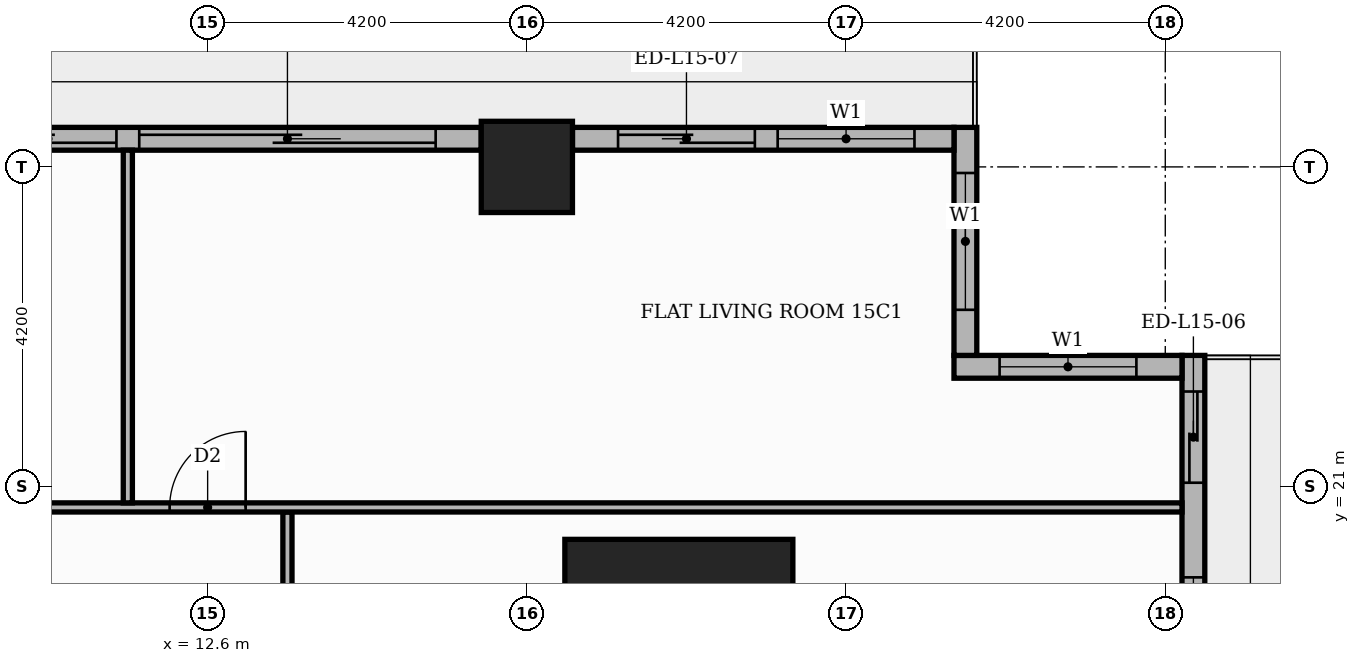
"""IFC4 building model, lengths in metres.
Left out: names, types, materials, properties, quantities, classifications, styles, units other than length and angle.
Written with IfcOpenShell. Run it as: python <this file> out.ifc"""

import sys

from ifc_helpers import new_model, si_unit, direction, frame, frame_2d, origin, origin_2d, place, context, subcontext, project, spatial, rectangle, extrude, element, fill, save


model = new_model("IFC4")
c1 = context("Model", 3, precision=1e-05, world=origin(), true_north=direction((0.0, 1.0)))
c2 = subcontext(c1, "Body", "Model", "MODEL_VIEW")
j1 = project(units=[si_unit("LENGTHUNIT", "METRE"), si_unit("PLANEANGLEUNIT", "RADIAN")], contexts=[c1])
p1 = place(None, origin())
s1 = spatial("IfcSite", under=j1, at=p1, CompositionType="ELEMENT")
p2 = place(p1, origin())
s2 = spatial("IfcBuilding", under=s1, at=p2, CompositionType="ELEMENT")
p3 = place(p2, frame((0.0, 0.0, 66.0)))
s3 = spatial("IfcBuildingStorey", under=s2, at=p3, CompositionType="ELEMENT", Elevation=66.0)
p4 = place(p3, frame((18.8, 18.8, 0.0), z_axis=(0.0, 0.0, 1.0), x_axis=(1.0, 0.0, 0.0)))
e1 = element("IfcColumn", 1, at=p4, inside=s3, PredefinedType="COLUMN", context=c2, shape_type="SweptSolid", body=[
    extrude(rectangle(XDim=3.0, YDim=3.0, at=origin_2d()), origin(), (0.0, 0.0, 1.0), 3.9),
])
p5 = place(p3, frame((16.8, 25.2, 0.0), z_axis=(0.0, 0.0, 1.0), x_axis=(1.0, 0.0, 0.0)))
e2 = element("IfcColumn", 2, at=p5, inside=s3, PredefinedType="COLUMN", context=c2, shape_type="SweptSolid", body=[
    extrude(rectangle(XDim=1.2, YDim=1.2, at=origin_2d()), origin(), (0.0, 0.0, 1.0), 3.9),
])
p6 = place(p3, frame((25.57, 17.4, 0.0), z_axis=(0.0, 0.0, 1.0), x_axis=(0.0, 1.0, 0.0)))
e3 = element("IfcWall", 3, at=p6, inside=s3, PredefinedType="STANDARD", context=c2, shape_type="SweptSolid", body=[
    extrude(rectangle(XDim=5.32, YDim=0.3, at=frame_2d((2.66, 0.0))), origin(), (0.0, 0.0, 1.0), 3.48),
])
p7 = place(p6, frame((0.6, 0.0, 0.9)))
e4 = element("IfcOpeningElement", 4, at=p7, cuts=e3, PredefinedType="OPENING", context=c2, shape_type="SweptSolid", body=[
    extrude(rectangle(XDim=1.8, YDim=2.1, at=frame_2d((0.9, 1.05))), frame((0.0, 0.16, 0.0), z_axis=(0.0, -1.0, 0.0), x_axis=(1.0, 0.0, 0.0)), (0.0, 0.0, 1.0), 0.32),
])
p8 = place(p6, frame((3.645, 0.0, 0.0)))
e5 = element("IfcOpeningElement", 5, at=p8, cuts=e3, PredefinedType="OPENING", context=c2, shape_type="SweptSolid", body=[
    extrude(rectangle(XDim=1.2, YDim=2.4, at=frame_2d((0.6, 1.2))), frame((0.0, 0.16, 0.0), z_axis=(0.0, -1.0, 0.0), x_axis=(1.0, 0.0, 0.0)), (0.0, 0.0, 1.0), 0.32),
])
p9 = place(p3, frame((25.42, 22.57, 0.0), z_axis=(0.0, 0.0, 1.0), x_axis=(-1.0, 0.0, 0.0)))
e6 = element("IfcWall", 6, at=p9, inside=s3, PredefinedType="STANDARD", context=c2, shape_type="SweptSolid", body=[
    extrude(rectangle(XDim=3.0, YDim=0.3, at=frame_2d((1.5, 0.0))), origin(), (0.0, 0.0, 1.0), 3.48),
])
p10 = place(p9, frame((0.6, 0.0, 0.9)))
e7 = element("IfcOpeningElement", 7, at=p10, cuts=e6, PredefinedType="OPENING", context=c2, shape_type="SweptSolid", body=[
    extrude(rectangle(XDim=1.8, YDim=2.1, at=frame_2d((0.9, 1.05))), frame((0.0, 0.16, 0.0), z_axis=(0.0, -1.0, 0.0), x_axis=(1.0, 0.0, 0.0)), (0.0, 0.0, 1.0), 0.32),
])
p11 = place(p3, frame((22.57, 22.72, 0.0), z_axis=(0.0, 0.0, 1.0), x_axis=(0.0, 1.0, 0.0)))
e8 = element("IfcWall", 8, at=p11, inside=s3, PredefinedType="STANDARD", context=c2, shape_type="SweptSolid", body=[
    extrude(rectangle(XDim=3.0, YDim=0.3, at=frame_2d((1.5, 0.0))), origin(), (0.0, 0.0, 1.0), 3.48),
])
p12 = place(p11, frame((0.6, 0.0, 0.9)))
e9 = element("IfcOpeningElement", 9, at=p12, cuts=e8, PredefinedType="OPENING", context=c2, shape_type="SweptSolid", body=[
    extrude(rectangle(XDim=1.8, YDim=2.1, at=frame_2d((0.9, 1.05))), frame((0.0, 0.16, 0.0), z_axis=(0.0, -1.0, 0.0), x_axis=(1.0, 0.0, 0.0)), (0.0, 0.0, 1.0), 0.32),
])
p13 = place(p3, frame((22.42, 25.57, 0.0), z_axis=(0.0, 0.0, 1.0), x_axis=(-1.0, 0.0, 0.0)))
e10 = element("IfcWall", 10, at=p13, inside=s3, PredefinedType="STANDARD", context=c2, shape_type="SweptSolid", body=[
    extrude(rectangle(XDim=5.02, YDim=0.3, at=frame_2d((2.51, 0.0))), origin(), (0.0, 0.0, 1.0), 3.48),
])
p14 = place(p13, frame((0.52, 0.0, 0.9)))
e11 = element("IfcOpeningElement", 11, at=p14, cuts=e10, PredefinedType="OPENING", context=c2, shape_type="SweptSolid", body=[
    extrude(rectangle(XDim=1.8, YDim=2.1, at=frame_2d((0.9, 1.05))), frame((0.0, 0.16, 0.0), z_axis=(0.0, -1.0, 0.0), x_axis=(1.0, 0.0, 0.0)), (0.0, 0.0, 1.0), 0.32),
])
p15 = place(p13, frame((2.62, 0.0, 0.0)))
e12 = element("IfcOpeningElement", 12, at=p15, cuts=e10, PredefinedType="OPENING", context=c2, shape_type="SweptSolid", body=[
    extrude(rectangle(XDim=1.8, YDim=2.4, at=frame_2d((0.9, 1.2))), frame((0.0, 0.16, 0.0), z_axis=(0.0, -1.0, 0.0), x_axis=(1.0, 0.0, 0.0)), (0.0, 0.0, 1.0), 0.32),
])
p16 = place(p3, frame((16.2, 25.57, 0.0), z_axis=(0.0, 0.0, 1.0), x_axis=(-1.0, 0.0, 0.0)))
e13 = element("IfcWall", 13, at=p16, inside=s3, PredefinedType="STANDARD", context=c2, shape_type="SweptSolid", body=[
    extrude(rectangle(XDim=7.2, YDim=0.3, at=frame_2d((3.6, 0.0))), origin(), (0.0, 0.0, 1.0), 3.48),
])
p17 = place(p16, frame((0.6, 0.0, 0.0)))
e14 = element("IfcOpeningElement", 14, at=p17, cuts=e13, PredefinedType="OPENING", context=c2, shape_type="SweptSolid", body=[
    extrude(rectangle(XDim=3.9, YDim=2.4, at=frame_2d((1.95, 1.2))), frame((0.0, 0.16, 0.0), z_axis=(0.0, -1.0, 0.0), x_axis=(1.0, 0.0, 0.0)), (0.0, 0.0, 1.0), 0.32),
])
p18 = place(p16, frame((4.8, 0.0, 0.0)))
e15 = element("IfcOpeningElement", 15, at=p18, cuts=e13, PredefinedType="OPENING", context=c2, shape_type="SweptSolid", body=[
    extrude(rectangle(XDim=1.8, YDim=2.4, at=frame_2d((0.9, 1.2))), frame((0.0, 0.16, 0.0), z_axis=(0.0, -1.0, 0.0), x_axis=(1.0, 0.0, 0.0)), (0.0, 0.0, 1.0), 0.32),
])
p19 = place(p3, frame((13.65, 13.75, 0.0), z_axis=(0.0, 0.0, 1.0), x_axis=(0.0, 1.0, 0.0)))
e16 = element("IfcWall", 16, at=p19, inside=s3, PredefinedType="PARTITIONING", context=c2, shape_type="SweptSolid", body=[
    extrude(rectangle(XDim=6.91, YDim=0.12, at=frame_2d((3.455, 0.0))), origin(), (0.0, 0.0, 1.0), 3.48),
])
p20 = place(p19, frame((2.935, 0.0, 0.0)))
e17 = element("IfcOpeningElement", 17, at=p20, cuts=e16, PredefinedType="OPENING", context=c2, shape_type="SweptSolid", body=[
    extrude(rectangle(XDim=1.0, YDim=2.1, at=frame_2d((0.5, 1.05))), frame((0.0, 0.07, 0.0), z_axis=(0.0, -1.0, 0.0), x_axis=(1.0, 0.0, 0.0)), (0.0, 0.0, 1.0), 0.14),
])
p21 = place(p3, frame((-13.55, 20.72, 0.0), z_axis=(0.0, 0.0, 1.0), x_axis=(1.0, 0.0, 0.0)))
e18 = element("IfcWall", 18, at=p21, inside=s3, PredefinedType="PARTITIONING", context=c2, shape_type="SweptSolid", body=[
    extrude(rectangle(XDim=38.97, YDim=0.12, at=frame_2d((19.485, 0.0))), origin(), (0.0, 0.0, 1.0), 3.48),
])
p22 = place(p21, frame((25.65, 0.0, 0.0)))
e19 = element("IfcOpeningElement", 19, at=p22, cuts=e18, PredefinedType="OPENING", context=c2, shape_type="SweptSolid", body=[
    extrude(rectangle(XDim=1.0, YDim=2.1, at=frame_2d((0.5, 1.05))), frame((0.0, 0.07, 0.0), z_axis=(0.0, -1.0, 0.0), x_axis=(1.0, 0.0, 0.0)), (0.0, 0.0, 1.0), 0.14),
])
p23 = place(p21, frame((20.45, 0.0, 0.0)))
e20 = element("IfcOpeningElement", 20, at=p23, cuts=e18, PredefinedType="OPENING", context=c2, shape_type="SweptSolid", body=[
    extrude(rectangle(XDim=0.9, YDim=2.1, at=frame_2d((0.45, 1.05))), frame((0.0, 0.07, 0.0), z_axis=(0.0, -1.0, 0.0), x_axis=(1.0, 0.0, 0.0)), (0.0, 0.0, 1.0), 0.14),
])
p24 = place(p21, frame((9.95, 0.0, 0.0)))
e21 = element("IfcOpeningElement", 21, at=p24, cuts=e18, PredefinedType="OPENING", context=c2, shape_type="SweptSolid", body=[
    extrude(rectangle(XDim=0.9, YDim=2.1, at=frame_2d((0.45, 1.05))), frame((0.0, 0.07, 0.0), z_axis=(0.0, -1.0, 0.0), x_axis=(1.0, 0.0, 0.0)), (0.0, 0.0, 1.0), 0.14),
])
p25 = place(p21, frame((2.6, 0.0, 0.0)))
e22 = element("IfcOpeningElement", 22, at=p25, cuts=e18, PredefinedType="OPENING", context=c2, shape_type="SweptSolid", body=[
    extrude(rectangle(XDim=0.9, YDim=2.1, at=frame_2d((0.45, 1.05))), frame((0.0, 0.07, 0.0), z_axis=(0.0, -1.0, 0.0), x_axis=(1.0, 0.0, 0.0)), (0.0, 0.0, 1.0), 0.14),
])
p26 = place(p3, frame((11.55, 20.78, 0.0), z_axis=(0.0, 0.0, 1.0), x_axis=(0.0, 1.0, 0.0)))
e23 = element("IfcWall", 23, at=p26, inside=s3, PredefinedType="PARTITIONING", context=c2, shape_type="SweptSolid", body=[
    extrude(rectangle(XDim=4.64, YDim=0.12, at=frame_2d((2.32, 0.0))), origin(), (0.0, 0.0, 1.0), 3.48),
])
p27 = place(p7, origin())
e24 = element("IfcWindow", 24, at=p27, inside=s3, PartitioningType="SINGLE_PANEL", PredefinedType="WINDOW", context=c2, shape_type="SweptSolid", body=[
    extrude(rectangle(XDim=1.8, YDim=2.1, at=frame_2d((0.9, 1.05))), frame((0.0, 0.03, 0.0), z_axis=(0.0, -1.0, 0.0), x_axis=(1.0, 0.0, 0.0)), (0.0, 0.0, 1.0), 0.06),
])
fill(e4, e24)
p28 = place(p8, origin())
e25 = element("IfcDoor", 25, at=p28, inside=s3, OperationType="SLIDING_TO_RIGHT", PredefinedType="DOOR", context=c2, shape_type="SweptSolid", body=[
    extrude(rectangle(XDim=1.2, YDim=2.4, at=frame_2d((0.6, 1.2))), frame((0.0, 0.025, 0.0), z_axis=(0.0, -1.0, 0.0), x_axis=(1.0, 0.0, 0.0)), (0.0, 0.0, 1.0), 0.05),
])
fill(e5, e25)
p29 = place(p10, origin())
e26 = element("IfcWindow", 26, at=p29, inside=s3, PartitioningType="SINGLE_PANEL", PredefinedType="WINDOW", context=c2, shape_type="SweptSolid", body=[
    extrude(rectangle(XDim=1.8, YDim=2.1, at=frame_2d((0.9, 1.05))), frame((0.0, 0.03, 0.0), z_axis=(0.0, -1.0, 0.0), x_axis=(1.0, 0.0, 0.0)), (0.0, 0.0, 1.0), 0.06),
])
fill(e7, e26)
p30 = place(p12, origin())
e27 = element("IfcWindow", 27, at=p30, inside=s3, PartitioningType="SINGLE_PANEL", PredefinedType="WINDOW", context=c2, shape_type="SweptSolid", body=[
    extrude(rectangle(XDim=1.8, YDim=2.1, at=frame_2d((0.9, 1.05))), frame((0.0, 0.03, 0.0), z_axis=(0.0, -1.0, 0.0), x_axis=(1.0, 0.0, 0.0)), (0.0, 0.0, 1.0), 0.06),
])
fill(e9, e27)
p31 = place(p14, origin())
e28 = element("IfcWindow", 28, at=p31, inside=s3, PartitioningType="SINGLE_PANEL", PredefinedType="WINDOW", context=c2, shape_type="SweptSolid", body=[
    extrude(rectangle(XDim=1.8, YDim=2.1, at=frame_2d((0.9, 1.05))), frame((0.0, 0.03, 0.0), z_axis=(0.0, -1.0, 0.0), x_axis=(1.0, 0.0, 0.0)), (0.0, 0.0, 1.0), 0.06),
])
fill(e11, e28)
p32 = place(p15, origin())
e29 = element("IfcDoor", 29, at=p32, inside=s3, OperationType="SLIDING_TO_RIGHT", PredefinedType="DOOR", context=c2, shape_type="SweptSolid", body=[
    extrude(rectangle(XDim=1.8, YDim=2.4, at=frame_2d((0.9, 1.2))), frame((0.0, 0.025, 0.0), z_axis=(0.0, -1.0, 0.0), x_axis=(1.0, 0.0, 0.0)), (0.0, 0.0, 1.0), 0.05),
])
fill(e12, e29)
p33 = place(p17, origin())
e30 = element("IfcDoor", 30, at=p33, inside=s3, OperationType="SLIDING_TO_LEFT", PredefinedType="DOOR", context=c2, shape_type="SweptSolid", body=[
    extrude(rectangle(XDim=3.9, YDim=2.4, at=frame_2d((1.95, 1.2))), frame((0.0, 0.025, 0.0), z_axis=(0.0, -1.0, 0.0), x_axis=(1.0, 0.0, 0.0)), (0.0, 0.0, 1.0), 0.05),
])
fill(e14, e30)
p34 = place(p18, origin())
e31 = element("IfcDoor", 31, at=p34, inside=s3, OperationType="SLIDING_TO_RIGHT", PredefinedType="DOOR", context=c2, shape_type="SweptSolid", body=[
    extrude(rectangle(XDim=1.8, YDim=2.4, at=frame_2d((0.9, 1.2))), frame((0.0, 0.025, 0.0), z_axis=(0.0, -1.0, 0.0), x_axis=(1.0, 0.0, 0.0)), (0.0, 0.0, 1.0), 0.05),
])
fill(e15, e31)
p35 = place(p22, origin())
e32 = element("IfcDoor", 32, at=p35, inside=s3, OperationType="SINGLE_SWING_RIGHT", PredefinedType="DOOR", context=c2, shape_type="SweptSolid", body=[
    extrude(rectangle(XDim=1.0, YDim=2.1, at=frame_2d((0.5, 1.05))), frame((0.0, 0.025, 0.0), z_axis=(0.0, -1.0, 0.0), x_axis=(1.0, 0.0, 0.0)), (0.0, 0.0, 1.0), 0.05),
])
fill(e19, e32)
save(model, sys.argv[1])
